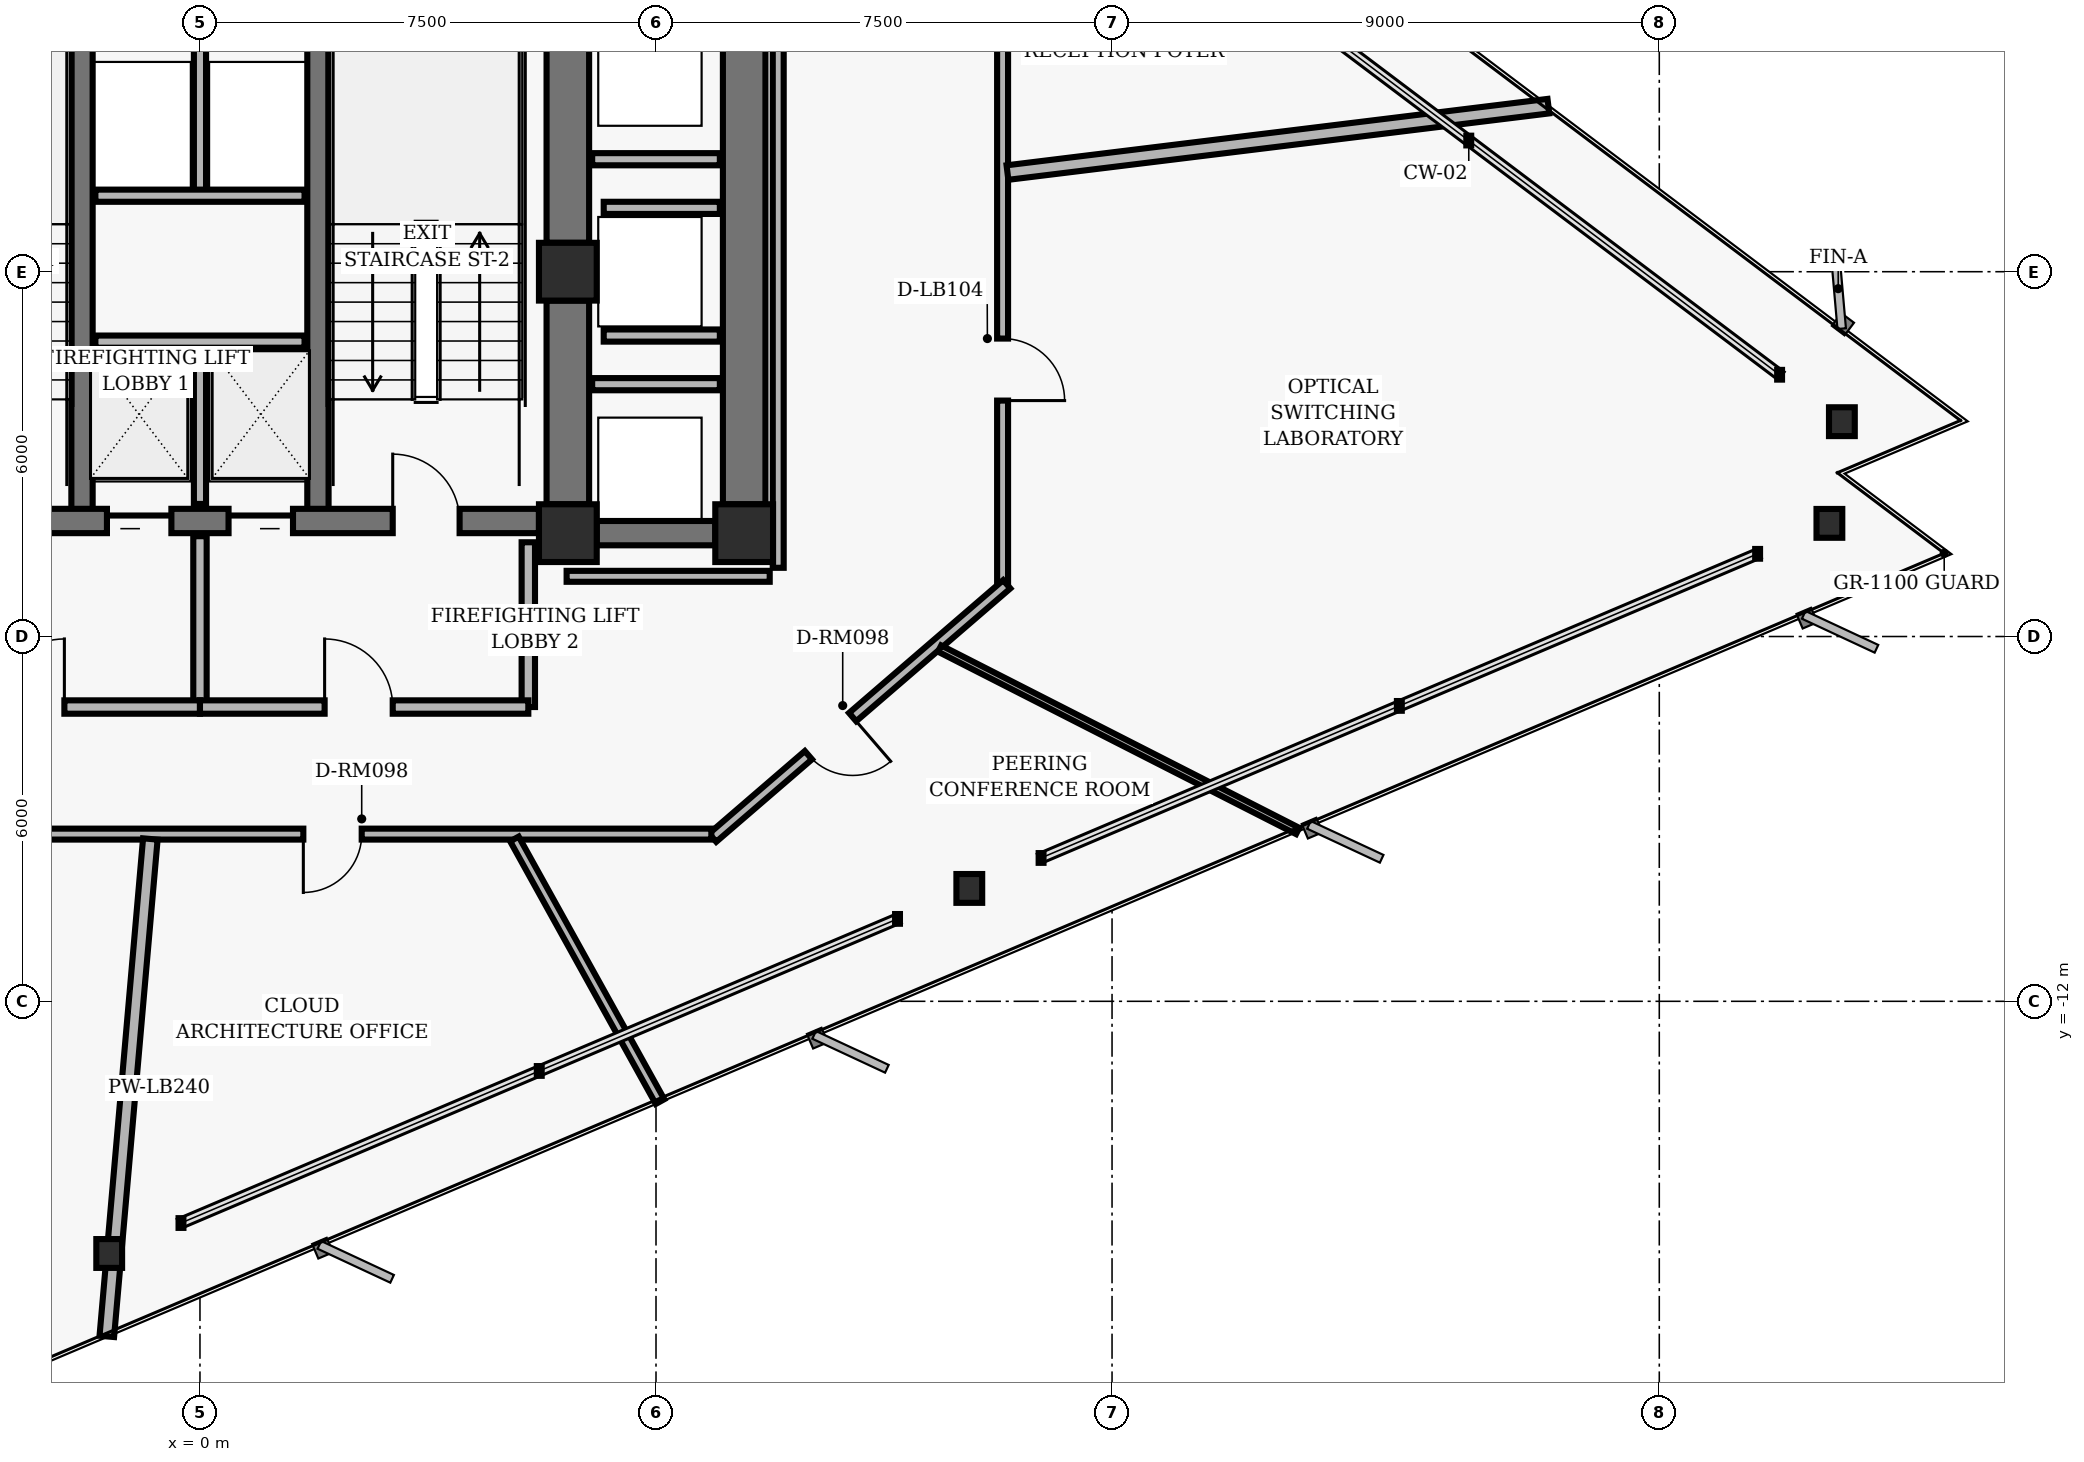
"""IFC4 building model, lengths in metres.
Left out: names, types, materials, properties, quantities, classifications, styles, units other than length and angle.
Written with IfcOpenShell. Run it as: python <this file> out.ifc"""

import sys

from ifc_helpers import new_model, si_unit, direction, frame, frame_2d, origin, origin_2d, place, context, subcontext, project, spatial, rectangle, hollow_rectangle, i_section, extrude, element, fill, save


model = new_model("IFC4")
c1 = context("Model", 3, precision=1e-05, world=origin(), true_north=direction((0.0, 1.0)))
c2 = subcontext(c1, "Body", "Model", "MODEL_VIEW")
j1 = project(units=[si_unit("LENGTHUNIT", "METRE"), si_unit("PLANEANGLEUNIT", "RADIAN")], contexts=[c1])
p1 = place(None, origin())
s1 = spatial("IfcSite", under=j1, at=p1, CompositionType="ELEMENT")
p2 = place(p1, origin())
s2 = spatial("IfcBuilding", under=s1, at=p2, CompositionType="ELEMENT")
p3 = place(p2, frame((0.0, 0.0, 59.68)))
s3 = spatial("IfcBuildingStorey", under=s2, at=p3, CompositionType="ELEMENT", Elevation=59.68)
for number, where, z_axis, x_axis in (
    (1, (6.05, 0.0, 0.0), (0.0, 0.0, 1.0), (1.0, 0.0, 0.0)),
    (2, (6.05, -4.3, 0.0), (0.0, 0.0, 1.0), (1.0, 0.0, 0.0)),
    (3, (8.95, -4.3, 0.0), (0.0, 0.0, 1.0), (1.0, 0.0, 0.0)),
):
    element("IfcColumn", number, at=place(p3, frame(where, z_axis=z_axis, x_axis=x_axis)), inside=s3, PredefinedType="COLUMN", context=c2, shape_type="SweptSolid", body=[
        extrude(hollow_rectangle(XDim=0.95, YDim=0.95, WallThickness=0.06, InnerFilletRadius=0.02, OuterFilletRadius=0.04, at=origin_2d()), origin(), (0.0, 0.0, 1.0), 3.36),
    ])
p4 = place(p3, frame((6.05, 0.475, 0.0), z_axis=(0.0, 0.0, 1.0), x_axis=(0.0, 1.0, 0.0)))
e4 = element("IfcWall", 4, at=p4, inside=s3, PredefinedType="SHEAR", context=c2, shape_type="SweptSolid", body=[
    extrude(rectangle(XDim=3.55, YDim=0.7, at=frame_2d((1.775, 0.0))), origin(), (0.0, 0.0, 1.0), 3.098),
])
p5 = place(p3, frame((6.05, -3.825, 0.0), z_axis=(0.0, 0.0, 1.0), x_axis=(0.0, 1.0, 0.0)))
e5 = element("IfcWall", 5, at=p5, inside=s3, PredefinedType="SHEAR", context=c2, shape_type="SweptSolid", body=[
    extrude(rectangle(XDim=3.35, YDim=0.7, at=frame_2d((1.675, 0.0))), origin(), (0.0, 0.0, 1.0), 3.098),
])
for number, where, z_axis, x_axis in (
    (6, (-1.94, -4.1, 0.0), (0.0, 0.0, 1.0), (0.0, 1.0, 0.0)),
    (7, (1.94, -4.1, 0.0), (0.0, 0.0, 1.0), (0.0, 1.0, 0.0)),
):
    element("IfcWall", number, at=place(p3, frame(where, z_axis=z_axis, x_axis=x_axis)), inside=s3, PredefinedType="SHEAR", context=c2, shape_type="SweptSolid", body=[
        extrude(rectangle(XDim=8.2, YDim=0.35, at=frame_2d((4.1, 0.0))), origin(), (0.0, 0.0, 1.0), 3.098),
    ])
p6 = place(p3, frame((-5.575, -4.1, 0.0), z_axis=(0.0, 0.0, 1.0), x_axis=(1.0, 0.0, 0.0)))
e8 = element("IfcWall", 8, at=p6, inside=s3, PredefinedType="SHEAR", context=c2, shape_type="SweptSolid", body=[
    extrude(rectangle(XDim=11.15, YDim=0.4, at=frame_2d((5.575, 0.0))), origin(), (0.0, 0.0, 1.0), 3.098),
])
p7 = place(p6, frame((1.305, 0.0, 0.0)))
e9 = element("IfcOpeningElement", 9, at=p7, cuts=e8, PredefinedType="OPENING", context=c2, shape_type="SweptSolid", body=[
    extrude(rectangle(XDim=1.1, YDim=2.04, at=frame_2d((0.55, 1.02))), frame((0.0, 0.21, 0.0), z_axis=(0.0, -1.0, 0.0), x_axis=(1.0, 0.0, 0.0)), (0.0, 0.0, 1.0), 0.42),
])
p8 = place(p6, frame((8.745, 0.0, 0.0)))
e10 = element("IfcOpeningElement", 10, at=p8, cuts=e8, PredefinedType="OPENING", context=c2, shape_type="SweptSolid", body=[
    extrude(rectangle(XDim=1.1, YDim=2.04, at=frame_2d((0.55, 1.02))), frame((0.0, 0.21, 0.0), z_axis=(0.0, -1.0, 0.0), x_axis=(1.0, 0.0, 0.0)), (0.0, 0.0, 1.0), 0.42),
])
p9 = place(p6, frame((4.045, 0.0, 0.0)))
e11 = element("IfcOpeningElement", 11, at=p9, cuts=e8, PredefinedType="OPENING", context=c2, shape_type="SweptSolid", body=[
    extrude(rectangle(XDim=1.06, YDim=2.04, at=frame_2d((0.53, 1.02))), frame((0.0, 0.21, 0.0), z_axis=(0.0, -1.0, 0.0), x_axis=(1.0, 0.0, 0.0)), (0.0, 0.0, 1.0), 0.42),
])
p10 = place(p6, frame((6.045, 0.0, 0.0)))
e12 = element("IfcOpeningElement", 12, at=p10, cuts=e8, PredefinedType="OPENING", context=c2, shape_type="SweptSolid", body=[
    extrude(rectangle(XDim=1.06, YDim=2.04, at=frame_2d((0.53, 1.02))), frame((0.0, 0.21, 0.0), z_axis=(0.0, -1.0, 0.0), x_axis=(1.0, 0.0, 0.0)), (0.0, 0.0, 1.0), 0.42),
])
p11 = place(p3, frame((8.95, -3.825, 0.0), z_axis=(0.0, 0.0, 1.0), x_axis=(0.0, 1.0, 0.0)))
e13 = element("IfcWall", 13, at=p11, inside=s3, PredefinedType="SHEAR", context=c2, shape_type="SweptSolid", body=[
    extrude(rectangle(XDim=7.85, YDim=0.7, at=frame_2d((3.925, 0.0))), origin(), (0.0, 0.0, 1.0), 3.098),
])
p12 = place(p3, frame((6.525, -4.3, 0.0), z_axis=(0.0, 0.0, 1.0), x_axis=(1.0, 0.0, 0.0)))
e14 = element("IfcWall", 14, at=p12, inside=s3, PredefinedType="SHEAR", context=c2, shape_type="SweptSolid", body=[
    extrude(rectangle(XDim=1.95, YDim=0.4, at=frame_2d((0.975, 0.0))), origin(), (0.0, 0.0, 1.0), 3.098),
])
for number, where, z_axis, x_axis in (
    (15, (27.003, -2.467, 0.0), (0.0, 0.0, 1.0), (1.0, 0.0, 0.0)),
    (16, (-1.493, -16.148, 0.0), (0.0, 0.0, 1.0), (1.0, 0.0, 0.0)),
    (17, (12.653, -10.143, 0.0), (0.0, 0.0, 1.0), (1.0, 0.0, 0.0)),
    (18, (26.798, -4.139, 0.0), (0.0, 0.0, 1.0), (1.0, 0.0, 0.0)),
):
    element("IfcColumn", number, at=place(p3, frame(where, z_axis=z_axis, x_axis=x_axis)), inside=s3, PredefinedType="COLUMN", context=c2, shape_type="SweptSolid", body=[
        extrude(i_section(OverallWidth=0.424, OverallDepth=0.474, WebThickness=0.048, FlangeThickness=0.077, FilletRadius=0.025, at=origin_2d()), origin(), (0.0, 0.0, 1.0), 3.36),
    ])
p13 = place(p3, frame((0.0, -3.82, 0.0), z_axis=(0.0, 0.0, 1.0), x_axis=(0.0, 1.0, 0.0)))
e19 = element("IfcWall", 19, at=p13, inside=s3, PredefinedType="PARTITIONING", context=c2, shape_type="SweptSolid", body=[
    extrude(rectangle(XDim=2.67, YDim=0.2, at=frame_2d((1.335, 0.0))), origin(), (0.0, 0.0, 1.0), 3.073),
])
p14 = place(p3, frame((-1.72, -1.15, 0.0), z_axis=(0.0, 0.0, 1.0), x_axis=(1.0, 0.0, 0.0)))
e20 = element("IfcWall", 20, at=p14, inside=s3, PredefinedType="PARTITIONING", context=c2, shape_type="SweptSolid", body=[
    extrude(rectangle(XDim=3.44, YDim=0.2, at=frame_2d((1.72, 0.0))), origin(), (0.0, 0.0, 1.0), 3.073),
])
p15 = place(p3, frame((5.4, -7.16, 0.0), z_axis=(0.0, 0.0, 1.0), x_axis=(0.0, 1.0, 0.0)))
e21 = element("IfcWall", 21, at=p15, inside=s3, PredefinedType="PARTITIONING", context=c2, shape_type="SweptSolid", body=[
    extrude(rectangle(XDim=2.71, YDim=0.22, at=frame_2d((1.355, 0.0))), origin(), (0.0, 0.0, 1.0), 3.073),
])
p16 = place(p3, frame((0.0, -7.16, 0.0), z_axis=(0.0, 0.0, 1.0), x_axis=(0.0, 1.0, 0.0)))
e22 = element("IfcWall", 22, at=p16, inside=s3, PredefinedType="PARTITIONING", context=c2, shape_type="SweptSolid", body=[
    extrude(rectangle(XDim=2.81, YDim=0.22, at=frame_2d((1.405, 0.0))), origin(), (0.0, 0.0, 1.0), 3.073),
])
p17 = place(p3, frame((-5.4, -7.16, 0.0), z_axis=(0.0, 0.0, 1.0), x_axis=(1.0, 0.0, 0.0)))
e23 = element("IfcWall", 23, at=p17, inside=s3, PredefinedType="PARTITIONING", context=c2, shape_type="SweptSolid", body=[
    extrude(rectangle(XDim=5.4, YDim=0.22, at=frame_2d((2.7, 0.0))), origin(), (0.0, 0.0, 1.0), 2.587),
])
p18 = place(p17, frame((2.05, 0.0, 0.0)))
e24 = element("IfcOpeningElement", 24, at=p18, cuts=e23, PredefinedType="OPENING", context=c2, shape_type="SweptSolid", body=[
    extrude(rectangle(XDim=1.12, YDim=2.02, at=frame_2d((0.56, 1.01))), frame((0.0, 0.12, 0.0), z_axis=(0.0, -1.0, 0.0), x_axis=(1.0, 0.0, 0.0)), (0.0, 0.0, 1.0), 0.24),
])
p19 = place(p3, frame((0.0, -7.16, 0.0), z_axis=(0.0, 0.0, 1.0), x_axis=(1.0, 0.0, 0.0)))
e25 = element("IfcWall", 25, at=p19, inside=s3, PredefinedType="PARTITIONING", context=c2, shape_type="SweptSolid", body=[
    extrude(rectangle(XDim=5.4, YDim=0.22, at=frame_2d((2.7, 0.0))), origin(), (0.0, 0.0, 1.0), 2.587),
])
p20 = place(p19, frame((2.05, 0.0, 0.0)))
e26 = element("IfcOpeningElement", 26, at=p20, cuts=e25, PredefinedType="OPENING", context=c2, shape_type="SweptSolid", body=[
    extrude(rectangle(XDim=1.12, YDim=2.02, at=frame_2d((0.56, 1.01))), frame((0.0, 0.12, 0.0), z_axis=(0.0, -1.0, 0.0), x_axis=(1.0, 0.0, 0.0)), (0.0, 0.0, 1.0), 0.24),
])
p21 = place(p3, frame((0.0, 1.25, 0.0), z_axis=(0.0, 0.0, 1.0), x_axis=(0.0, 1.0, 0.0)))
e27 = element("IfcWall", 27, at=p21, inside=s3, PredefinedType="PARTITIONING", context=c2, shape_type="SweptSolid", body=[
    extrude(rectangle(XDim=2.77, YDim=0.2, at=frame_2d((1.385, 0.0))), origin(), (0.0, 0.0, 1.0), 3.073),
])
p22 = place(p3, frame((-1.72, 1.25, 0.0), z_axis=(0.0, 0.0, 1.0), x_axis=(1.0, 0.0, 0.0)))
e28 = element("IfcWall", 28, at=p22, inside=s3, PredefinedType="PARTITIONING", context=c2, shape_type="SweptSolid", body=[
    extrude(rectangle(XDim=3.44, YDim=0.2, at=frame_2d((1.72, 0.0))), origin(), (0.0, 0.0, 1.0), 3.073),
])
for number, where, z_axis, x_axis in (
    (29, (6.45, -1.85, 0.0), (0.0, 0.0, 1.0), (1.0, 0.0, 0.0)),
    (30, (6.45, 1.85, 0.0), (0.0, 0.0, 1.0), (1.0, 0.0, 0.0)),
):
    element("IfcWall", number, at=place(p3, frame(where, z_axis=z_axis, x_axis=x_axis)), inside=s3, PredefinedType="PARTITIONING", context=c2, shape_type="SweptSolid", body=[
        extrude(rectangle(XDim=2.1, YDim=0.2, at=frame_2d((1.05, 0.0))), origin(), (0.0, 0.0, 1.0), 3.073),
    ])
for number, where, z_axis, x_axis in (
    (31, (6.64, -1.05, 0.0), (0.0, 0.0, 1.0), (1.0, 0.0, 0.0)),
    (32, (6.64, 1.05, 0.0), (0.0, 0.0, 1.0), (1.0, 0.0, 0.0)),
):
    element("IfcWall", number, at=place(p3, frame(where, z_axis=z_axis, x_axis=x_axis)), inside=s3, PredefinedType="PARTITIONING", context=c2, shape_type="SweptSolid", body=[
        extrude(rectangle(XDim=1.91, YDim=0.2, at=frame_2d((0.955, 0.0))), origin(), (0.0, 0.0, 1.0), 3.073),
    ])
p23 = place(p3, frame((13.2, 5.11, 0.0), z_axis=(0.0, 0.0, 1.0), x_axis=(0.0, -1.0, 0.0)))
e33 = element("IfcWall", 33, at=p23, inside=s3, PredefinedType="PARTITIONING", context=c2, shape_type="SweptSolid", body=[
    extrude(rectangle(XDim=10.22, YDim=0.18, at=frame_2d((5.11, 0.0))), origin(), (0.0, 0.0, 1.0), 3.073),
])
p24 = place(p23, frame((6.21, 0.0, 0.0)))
e34 = element("IfcOpeningElement", 34, at=p24, cuts=e33, PredefinedType="OPENING", context=c2, shape_type="SweptSolid", body=[
    extrude(rectangle(XDim=1.02, YDim=2.02, at=frame_2d((0.51, 1.01))), frame((0.0, 0.1, 0.0), z_axis=(0.0, -1.0, 0.0), x_axis=(1.0, 0.0, 0.0)), (0.0, 0.0, 1.0), 0.2),
])
p25 = place(p3, frame((13.268, -5.141, 0.0), z_axis=(0.0, 0.0, 1.0), x_axis=(-0.757534501725, -0.65279512766, 0.0)))
e35 = element("IfcWall", 35, at=p25, inside=s3, PredefinedType="PARTITIONING", context=c2, shape_type="SweptSolid", body=[
    extrude(rectangle(XDim=6.385, YDim=0.18, at=frame_2d((3.192, 0.0))), origin(), (0.0, 0.0, 1.0), 3.073),
])
p26 = place(p25, frame((3.346, 0.0, 0.0)))
e36 = element("IfcOpeningElement", 36, at=p26, cuts=e35, PredefinedType="OPENING", context=c2, shape_type="SweptSolid", body=[
    extrude(rectangle(XDim=0.96, YDim=2.02, at=frame_2d((0.48, 1.01))), frame((0.0, 0.1, 0.0), z_axis=(0.0, -1.0, 0.0), x_axis=(1.0, 0.0, 0.0)), (0.0, 0.0, 1.0), 0.2),
])
p27 = place(p3, frame((8.41, -9.25, 0.0), z_axis=(0.0, 0.0, 1.0), x_axis=(-1.0, 0.0, 0.0)))
e37 = element("IfcWall", 37, at=p27, inside=s3, PredefinedType="PARTITIONING", context=c2, shape_type="SweptSolid", body=[
    extrude(rectangle(XDim=17.0, YDim=0.18, at=frame_2d((8.5, 0.0))), origin(), (0.0, 0.0, 1.0), 2.587),
])
p28 = place(p27, frame((12.127, 0.0, 0.0)))
e38 = element("IfcOpeningElement", 38, at=p28, cuts=e37, PredefinedType="OPENING", context=c2, shape_type="SweptSolid", body=[
    extrude(rectangle(XDim=0.96, YDim=2.02, at=frame_2d((0.48, 1.01))), frame((0.0, 0.1, 0.0), z_axis=(0.0, -1.0, 0.0), x_axis=(1.0, 0.0, 0.0)), (0.0, 0.0, 1.0), 0.2),
])
p29 = place(p27, frame((5.75, 0.0, 0.0)))
e39 = element("IfcOpeningElement", 39, at=p29, cuts=e37, PredefinedType="OPENING", context=c2, shape_type="SweptSolid", body=[
    extrude(rectangle(XDim=0.96, YDim=2.02, at=frame_2d((0.48, 1.01))), frame((0.0, 0.1, 0.0), z_axis=(0.0, -1.0, 0.0), x_axis=(1.0, 0.0, 0.0)), (0.0, 0.0, 1.0), 0.2),
])
p30 = place(p3, frame((6.03, -5.01, 0.0), z_axis=(0.0, 0.0, 1.0), x_axis=(1.0, 0.0, 0.0)))
e40 = element("IfcWall", 40, at=p30, inside=s3, PredefinedType="PARTITIONING", context=c2, shape_type="SweptSolid", body=[
    extrude(rectangle(XDim=3.34, YDim=0.18, at=frame_2d((1.67, 0.0))), origin(), (0.0, 0.0, 1.0), 3.073),
])
p31 = place(p3, frame((9.51, -4.87, 0.0), z_axis=(0.0, 0.0, 1.0), x_axis=(0.0, 1.0, 0.0)))
e41 = element("IfcWall", 41, at=p31, inside=s3, PredefinedType="PARTITIONING", context=c2, shape_type="SweptSolid", body=[
    extrude(rectangle(XDim=9.74, YDim=0.18, at=frame_2d((4.87, 0.0))), origin(), (0.0, 0.0, 1.0), 3.073),
])
p32 = place(p3, frame((-0.816, -9.33, 0.0), z_axis=(0.0, 0.0, 1.0), x_axis=(-0.087131179551, -0.996196846788, 0.0)))
e42 = element("IfcWall", 42, at=p32, inside=s3, PredefinedType="PARTITIONING", context=c2, shape_type="SweptSolid", body=[
    extrude(rectangle(XDim=8.213, YDim=0.24, at=frame_2d((4.106, 0.0))), origin(), (0.0, 0.0, 1.0), 3.073),
])
p33 = place(p3, frame((5.172, -9.33, 0.0), z_axis=(0.0, 0.0, 1.0), x_axis=(0.484815832005, -0.874616263876, 0.0)))
e43 = element("IfcWall", 43, at=p33, inside=s3, PredefinedType="PARTITIONING", context=c2, shape_type="SweptSolid", body=[
    extrude(rectangle(XDim=4.938, YDim=0.16, at=frame_2d((2.469, 0.0))), origin(), (0.0, 0.0, 1.0), 3.073),
])
p34 = place(p3, frame((12.164, -6.198, 0.0), z_axis=(0.0, 0.0, 1.0), x_axis=(0.891002560884, -0.453998278079, 0.0)))
e44 = element("IfcWall", 44, at=p34, inside=s3, PredefinedType="MOVABLE", context=c2, shape_type="SweptSolid", body=[
    extrude(rectangle(XDim=6.608, YDim=0.115, at=frame_2d((3.304, 0.0))), origin(), (0.0, 0.0, 1.0), 3.073),
])
p35 = place(p3, frame((13.28, 1.631, 0.0), z_axis=(0.0, 0.0, 1.0), x_axis=(0.992547039209, 0.121862114529, 0.0)))
e45 = element("IfcWall", 45, at=p35, inside=s3, PredefinedType="PARTITIONING", context=c2, shape_type="SweptSolid", body=[
    extrude(rectangle(XDim=8.963, YDim=0.24, at=frame_2d((4.482, 0.0))), origin(), (0.0, 0.0, 1.0), 3.073),
])
p36 = place(p8, origin())
e46 = element("IfcDoor", 46, at=p36, inside=s3, OperationType="SINGLE_SWING_LEFT", PredefinedType="DOOR", context=c2, shape_type="SweptSolid", body=[
    extrude(rectangle(XDim=1.1, YDim=2.04, at=frame_2d((0.55, 1.02))), frame((0.0, 0.025, 0.0), z_axis=(0.0, -1.0, 0.0), x_axis=(1.0, 0.0, 0.0)), (0.0, 0.0, 1.0), 0.05),
])
fill(e10, e46)
p37 = place(p9, origin())
e47 = element("IfcDoor", 47, at=p37, inside=s3, OperationType="SLIDING_TO_LEFT", PredefinedType="DOOR", context=c2, shape_type="SweptSolid", body=[
    extrude(rectangle(XDim=1.06, YDim=2.04, at=frame_2d((0.53, 1.02))), frame((0.0, 0.025, 0.0), z_axis=(0.0, -1.0, 0.0), x_axis=(1.0, 0.0, 0.0)), (0.0, 0.0, 1.0), 0.05),
])
fill(e11, e47)
p38 = place(p10, origin())
e48 = element("IfcDoor", 48, at=p38, inside=s3, OperationType="SLIDING_TO_RIGHT", PredefinedType="DOOR", context=c2, shape_type="SweptSolid", body=[
    extrude(rectangle(XDim=1.06, YDim=2.04, at=frame_2d((0.53, 1.02))), frame((0.0, 0.025, 0.0), z_axis=(0.0, -1.0, 0.0), x_axis=(1.0, 0.0, 0.0)), (0.0, 0.0, 1.0), 0.05),
])
fill(e12, e48)
p39 = place(p18, origin())
e49 = element("IfcDoor", 49, at=p39, inside=s3, OperationType="SINGLE_SWING_RIGHT", PredefinedType="DOOR", context=c2, shape_type="SweptSolid", body=[
    extrude(rectangle(XDim=1.12, YDim=2.02, at=frame_2d((0.56, 1.01))), frame((0.0, 0.025, 0.0), z_axis=(0.0, -1.0, 0.0), x_axis=(1.0, 0.0, 0.0)), (0.0, 0.0, 1.0), 0.05),
])
fill(e24, e49)
p40 = place(p20, origin())
e50 = element("IfcDoor", 50, at=p40, inside=s3, OperationType="SINGLE_SWING_LEFT", PredefinedType="DOOR", context=c2, shape_type="SweptSolid", body=[
    extrude(rectangle(XDim=1.12, YDim=2.02, at=frame_2d((0.56, 1.01))), frame((0.0, 0.025, 0.0), z_axis=(0.0, -1.0, 0.0), x_axis=(1.0, 0.0, 0.0)), (0.0, 0.0, 1.0), 0.05),
])
fill(e26, e50)
p41 = place(p29, origin())
e51 = element("IfcDoor", 51, at=p41, inside=s3, OperationType="SINGLE_SWING_RIGHT", PredefinedType="DOOR", context=c2, shape_type="SweptSolid", body=[
    extrude(rectangle(XDim=0.96, YDim=2.02, at=frame_2d((0.48, 1.01))), frame((0.0, 0.025, 0.0), z_axis=(0.0, -1.0, 0.0), x_axis=(1.0, 0.0, 0.0)), (0.0, 0.0, 1.0), 0.05),
])
fill(e39, e51)
p42 = place(p26, origin())
e52 = element("IfcDoor", 52, at=p42, inside=s3, OperationType="SINGLE_SWING_LEFT", PredefinedType="DOOR", context=c2, shape_type="SweptSolid", body=[
    extrude(rectangle(XDim=0.96, YDim=2.02, at=frame_2d((0.48, 1.01))), frame((0.0, 0.025, 0.0), z_axis=(0.0, -1.0, 0.0), x_axis=(1.0, 0.0, 0.0)), (0.0, 0.0, 1.0), 0.05),
])
fill(e36, e52)
p43 = place(p24, origin())
e53 = element("IfcDoor", 53, at=p43, inside=s3, OperationType="SINGLE_SWING_RIGHT", PredefinedType="DOOR", context=c2, shape_type="SweptSolid", body=[
    extrude(rectangle(XDim=1.02, YDim=2.02, at=frame_2d((0.51, 1.01))), frame((0.0, 0.025, 0.0), z_axis=(0.0, -1.0, 0.0), x_axis=(1.0, 0.0, 0.0)), (0.0, 0.0, 1.0), 0.05),
])
fill(e34, e53)
save(model, sys.argv[1])
